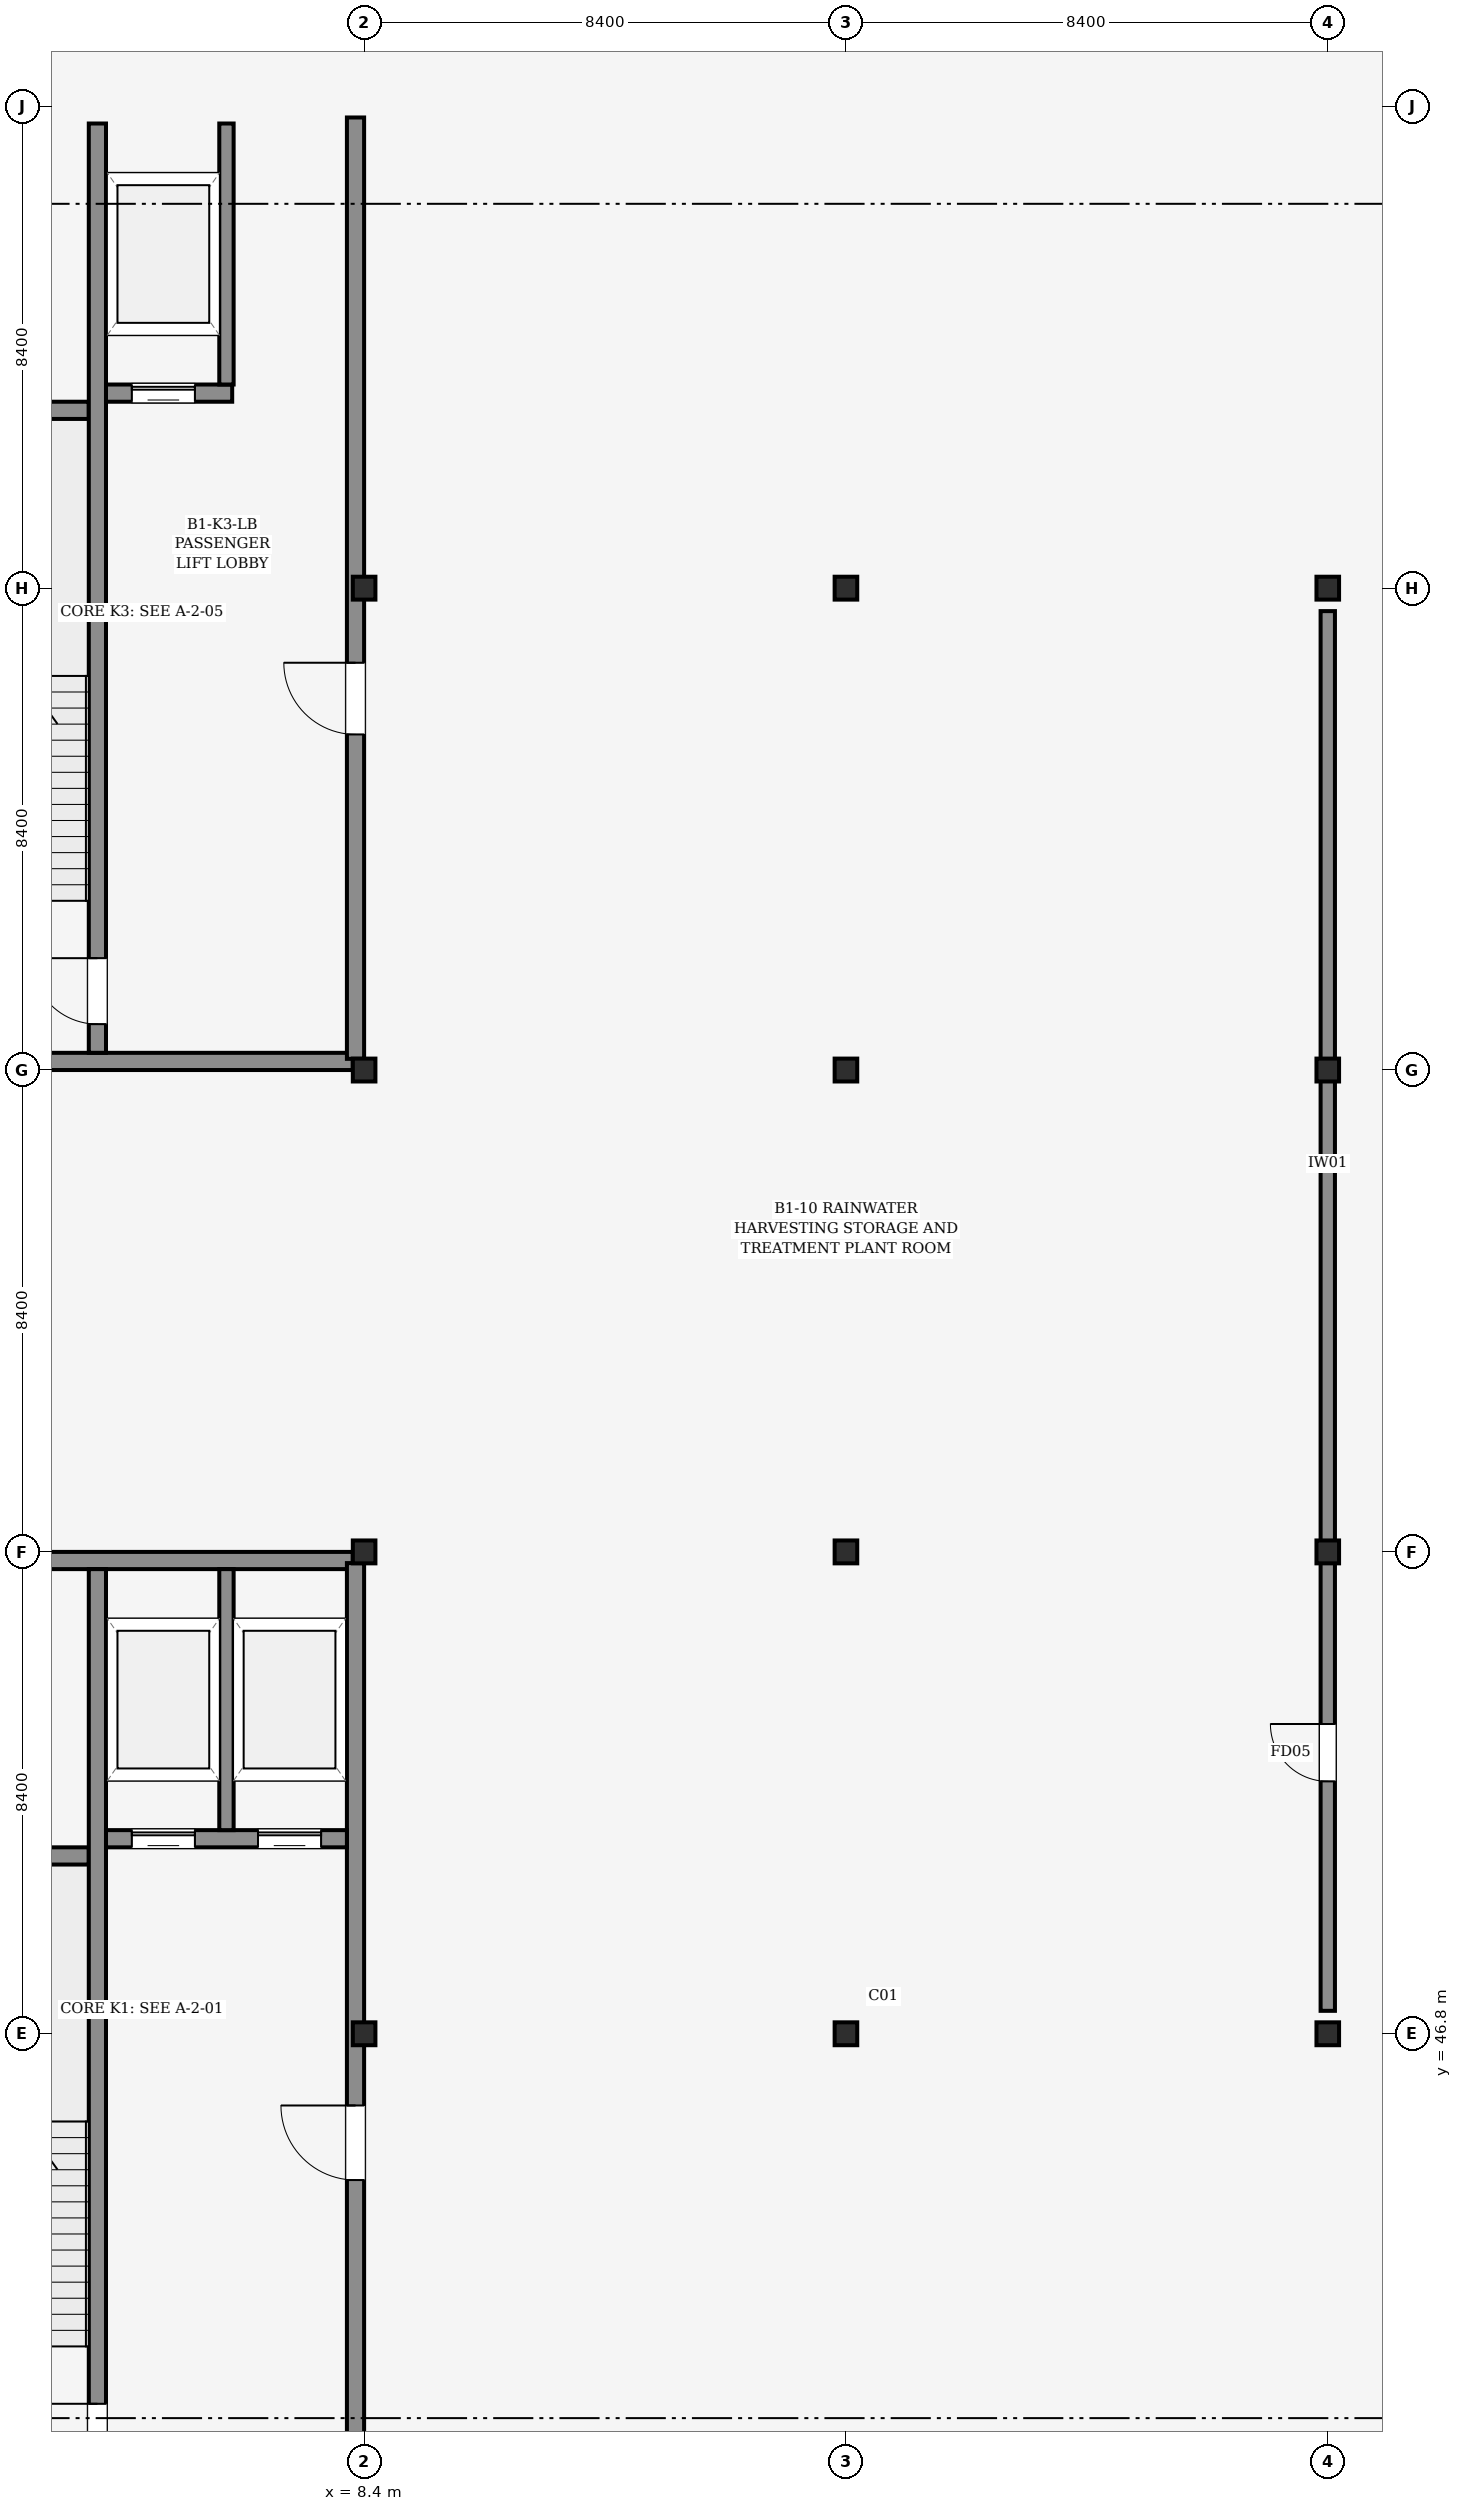
"""IFC4 building model, lengths in metres.
Left out: names, types, materials, properties, quantities, classifications, styles, units other than length and angle.
Written with IfcOpenShell. Run it as: python <this file> out.ifc"""

import sys

from ifc_helpers import new_model, si_unit, direction, frame, frame_2d, origin, origin_2d, place, context, subcontext, project, spatial, rectangle, i_section, extrude, element, fill, save


model = new_model("IFC4")
c1 = context("Model", 3, precision=1e-05, world=origin(), true_north=direction((0.0, 1.0)))
c2 = subcontext(c1, "Body", "Model", "MODEL_VIEW")
j1 = project(units=[si_unit("LENGTHUNIT", "METRE"), si_unit("PLANEANGLEUNIT", "RADIAN")], contexts=[c1])
p1 = place(None, origin())
s1 = spatial("IfcSite", under=j1, at=p1, CompositionType="ELEMENT")
p2 = place(p1, origin())
s2 = spatial("IfcBuilding", under=s1, at=p2, CompositionType="ELEMENT")
p3 = place(p2, frame((0.0, 0.0, -5.4)))
s3 = spatial("IfcBuildingStorey", under=s2, at=p3, CompositionType="ELEMENT", Elevation=-5.4)
for number, where, z_axis, x_axis in (
    (1, (8.4, 46.8, 0.0), (0.0, 0.0, 1.0), (1.0, 0.0, 0.0)),
    (2, (8.4, 55.2, 0.0), (0.0, 0.0, 1.0), (1.0, 0.0, 0.0)),
    (3, (8.4, 63.6, 0.0), (0.0, 0.0, 1.0), (1.0, 0.0, 0.0)),
    (4, (8.4, 72.0, 0.0), (0.0, 0.0, 1.0), (1.0, 0.0, 0.0)),
    (5, (8.4, 80.4, 0.0), (0.0, 0.0, 1.0), (1.0, 0.0, 0.0)),
    (6, (16.8, 46.8, 0.0), (0.0, 0.0, 1.0), (1.0, 0.0, 0.0)),
    (7, (16.8, 55.2, 0.0), (0.0, 0.0, 1.0), (1.0, 0.0, 0.0)),
    (8, (16.8, 63.6, 0.0), (0.0, 0.0, 1.0), (1.0, 0.0, 0.0)),
    (9, (16.8, 72.0, 0.0), (0.0, 0.0, 1.0), (1.0, 0.0, 0.0)),
    (10, (16.8, 80.4, 0.0), (0.0, 0.0, 1.0), (1.0, 0.0, 0.0)),
    (11, (25.2, 46.8, 0.0), (0.0, 0.0, 1.0), (1.0, 0.0, 0.0)),
    (12, (25.2, 55.2, 0.0), (0.0, 0.0, 1.0), (1.0, 0.0, 0.0)),
    (13, (25.2, 63.6, 0.0), (0.0, 0.0, 1.0), (1.0, 0.0, 0.0)),
    (14, (25.2, 72.0, 0.0), (0.0, 0.0, 1.0), (1.0, 0.0, 0.0)),
    (15, (25.2, 80.4, 0.0), (0.0, 0.0, 1.0), (1.0, 0.0, 0.0)),
):
    element("IfcColumn", number, at=place(p3, frame(where, z_axis=z_axis, x_axis=x_axis)), inside=s3, PredefinedType="COLUMN", context=c2, shape_type="SweptSolid", body=[
        extrude(i_section(OverallWidth=0.399, OverallDepth=0.394, WebThickness=0.023, FlangeThickness=0.037, FilletRadius=0.015, at=origin_2d()), origin(), (0.0, 0.0, 1.0), 5.4),
    ])
p4 = place(p3, frame((0.198, 55.05, 0.0), z_axis=(0.0, 0.0, 1.0), x_axis=(1.0, 0.0, 0.0)))
e16 = element("IfcWall", 16, at=p4, inside=s3, PredefinedType="SHEAR", context=c2, shape_type="SweptSolid", body=[
    extrude(rectangle(XDim=8.005, YDim=0.3, at=frame_2d((4.002, 0.0))), origin(), (0.0, 0.0, 1.0), 5.12),
])
p5 = place(p3, frame((0.3, 49.9, 0.0), z_axis=(0.0, 0.0, 1.0), x_axis=(1.0, 0.0, 0.0)))
e17 = element("IfcWall", 17, at=p5, inside=s3, PredefinedType="SHEAR", context=c2, shape_type="SweptSolid", body=[
    extrude(rectangle(XDim=3.3, YDim=0.3, at=frame_2d((1.65, 0.0))), origin(), (0.0, 0.0, 1.0), 5.12),
])
p6 = place(p3, frame((8.25, 38.595, 0.0), z_axis=(0.0, 0.0, 1.0), x_axis=(0.0, 1.0, 0.0)))
e18 = element("IfcWall", 18, at=p6, inside=s3, PredefinedType="SHEAR", context=c2, shape_type="SweptSolid", body=[
    extrude(rectangle(XDim=16.41, YDim=0.3, at=frame_2d((8.205, 0.0))), origin(), (0.0, 0.0, 1.0), 5.12),
])
p7 = place(p6, frame((5.655, 0.0, 0.0)))
e19 = element("IfcOpeningElement", 19, at=p7, cuts=e18, PredefinedType="OPENING", context=c2, shape_type="SweptSolid", body=[
    extrude(rectangle(XDim=1.3, YDim=2.2, at=frame_2d((0.65, 1.1))), frame((0.0, 0.16, 0.0), z_axis=(0.0, -1.0, 0.0), x_axis=(1.0, 0.0, 0.0)), (0.0, 0.0, 1.0), 0.32),
])
p8 = place(p3, frame((3.75, 38.7, 0.0), z_axis=(0.0, 0.0, 1.0), x_axis=(0.0, 1.0, 0.0)))
e20 = element("IfcWall", 20, at=p8, inside=s3, PredefinedType="SHEAR", context=c2, shape_type="SweptSolid", body=[
    extrude(rectangle(XDim=16.2, YDim=0.3, at=frame_2d((8.1, 0.0))), origin(), (0.0, 0.0, 1.0), 5.12),
])
p9 = place(p8, frame((0.5, 0.0, 0.0)))
e21 = element("IfcOpeningElement", 21, at=p9, cuts=e20, PredefinedType="OPENING", context=c2, shape_type="SweptSolid", body=[
    extrude(rectangle(XDim=1.15, YDim=2.15, at=frame_2d((0.575, 1.075))), frame((0.0, 0.16, 0.0), z_axis=(0.0, -1.0, 0.0), x_axis=(1.0, 0.0, 0.0)), (0.0, 0.0, 1.0), 0.32),
])
p10 = place(p3, frame((3.9, 50.2, 0.0), z_axis=(0.0, 0.0, 1.0), x_axis=(1.0, 0.0, 0.0)))
e22 = element("IfcWall", 22, at=p10, inside=s3, PredefinedType="SHEAR", context=c2, shape_type="SweptSolid", body=[
    extrude(rectangle(XDim=4.2, YDim=0.3, at=frame_2d((2.1, 0.0))), origin(), (0.0, 0.0, 1.0), 5.12),
])
p11 = place(p10, frame((0.45, 0.0, 0.0)))
e23 = element("IfcOpeningElement", 23, at=p11, cuts=e22, PredefinedType="OPENING", context=c2, shape_type="SweptSolid", body=[
    extrude(rectangle(XDim=1.1, YDim=2.2, at=frame_2d((0.55, 1.1))), frame((0.0, 0.16, 0.0), z_axis=(0.0, -1.0, 0.0), x_axis=(1.0, 0.0, 0.0)), (0.0, 0.0, 1.0), 0.32),
])
p12 = place(p10, frame((2.65, 0.0, 0.0)))
e24 = element("IfcOpeningElement", 24, at=p12, cuts=e22, PredefinedType="OPENING", context=c2, shape_type="SweptSolid", body=[
    extrude(rectangle(XDim=1.1, YDim=2.2, at=frame_2d((0.55, 1.1))), frame((0.0, 0.16, 0.0), z_axis=(0.0, -1.0, 0.0), x_axis=(1.0, 0.0, 0.0)), (0.0, 0.0, 1.0), 0.32),
])
p13 = place(p3, frame((6.0, 50.35, 0.0), z_axis=(0.0, 0.0, 1.0), x_axis=(0.0, 1.0, 0.0)))
e25 = element("IfcWall", 25, at=p13, inside=s3, PredefinedType="PARTITIONING", context=c2, shape_type="SweptSolid", body=[
    extrude(rectangle(XDim=4.55, YDim=0.25, at=frame_2d((2.275, 0.0))), origin(), (0.0, 0.0, 1.0), 4.025),
])
for number, where, z_axis, x_axis in (
    (26, (0.198, 63.75, 0.0), (0.0, 0.0, 1.0), (1.0, 0.0, 0.0)),
    (27, (0.198, 80.25, 0.0), (0.0, 0.0, 1.0), (1.0, 0.0, 0.0)),
):
    element("IfcWall", number, at=place(p3, frame(where, z_axis=z_axis, x_axis=x_axis)), inside=s3, PredefinedType="SHEAR", context=c2, shape_type="SweptSolid", body=[
        extrude(rectangle(XDim=8.005, YDim=0.3, at=frame_2d((4.002, 0.0))), origin(), (0.0, 0.0, 1.0), 5.12),
    ])
p14 = place(p3, frame((0.3, 75.1, 0.0), z_axis=(0.0, 0.0, 1.0), x_axis=(1.0, 0.0, 0.0)))
e28 = element("IfcWall", 28, at=p14, inside=s3, PredefinedType="SHEAR", context=c2, shape_type="SweptSolid", body=[
    extrude(rectangle(XDim=3.3, YDim=0.3, at=frame_2d((1.65, 0.0))), origin(), (0.0, 0.0, 1.0), 5.12),
])
p15 = place(p3, frame((8.25, 63.795, 0.0), z_axis=(0.0, 0.0, 1.0), x_axis=(0.0, 1.0, 0.0)))
e29 = element("IfcWall", 29, at=p15, inside=s3, PredefinedType="SHEAR", context=c2, shape_type="SweptSolid", body=[
    extrude(rectangle(XDim=16.41, YDim=0.3, at=frame_2d((8.205, 0.0))), origin(), (0.0, 0.0, 1.0), 5.12),
])
p16 = place(p15, frame((5.655, 0.0, 0.0)))
e30 = element("IfcOpeningElement", 30, at=p16, cuts=e29, PredefinedType="OPENING", context=c2, shape_type="SweptSolid", body=[
    extrude(rectangle(XDim=1.25, YDim=2.15, at=frame_2d((0.625, 1.075))), frame((0.0, 0.16, 0.0), z_axis=(0.0, -1.0, 0.0), x_axis=(1.0, 0.0, 0.0)), (0.0, 0.0, 1.0), 0.32),
])
p17 = place(p3, frame((3.75, 63.9, 0.0), z_axis=(0.0, 0.0, 1.0), x_axis=(0.0, 1.0, 0.0)))
e31 = element("IfcWall", 31, at=p17, inside=s3, PredefinedType="SHEAR", context=c2, shape_type="SweptSolid", body=[
    extrude(rectangle(XDim=16.2, YDim=0.3, at=frame_2d((8.1, 0.0))), origin(), (0.0, 0.0, 1.0), 5.12),
])
p18 = place(p17, frame((0.5, 0.0, 0.0)))
e32 = element("IfcOpeningElement", 32, at=p18, cuts=e31, PredefinedType="OPENING", context=c2, shape_type="SweptSolid", body=[
    extrude(rectangle(XDim=1.15, YDim=2.15, at=frame_2d((0.575, 1.075))), frame((0.0, 0.16, 0.0), z_axis=(0.0, -1.0, 0.0), x_axis=(1.0, 0.0, 0.0)), (0.0, 0.0, 1.0), 0.32),
])
p19 = place(p3, frame((3.9, 75.4, 0.0), z_axis=(0.0, 0.0, 1.0), x_axis=(1.0, 0.0, 0.0)))
e33 = element("IfcWall", 33, at=p19, inside=s3, PredefinedType="SHEAR", context=c2, shape_type="SweptSolid", body=[
    extrude(rectangle(XDim=2.2, YDim=0.3, at=frame_2d((1.1, 0.0))), origin(), (0.0, 0.0, 1.0), 5.12),
])
p20 = place(p19, frame((0.45, 0.0, 0.0)))
e34 = element("IfcOpeningElement", 34, at=p20, cuts=e33, PredefinedType="OPENING", context=c2, shape_type="SweptSolid", body=[
    extrude(rectangle(XDim=1.1, YDim=2.2, at=frame_2d((0.55, 1.1))), frame((0.0, 0.16, 0.0), z_axis=(0.0, -1.0, 0.0), x_axis=(1.0, 0.0, 0.0)), (0.0, 0.0, 1.0), 0.32),
])
p21 = place(p3, frame((6.0, 75.55, 0.0), z_axis=(0.0, 0.0, 1.0), x_axis=(0.0, 1.0, 0.0)))
e35 = element("IfcWall", 35, at=p21, inside=s3, PredefinedType="PARTITIONING", context=c2, shape_type="SweptSolid", body=[
    extrude(rectangle(XDim=4.55, YDim=0.25, at=frame_2d((2.275, 0.0))), origin(), (0.0, 0.0, 1.0), 4.025),
])
p22 = place(p3, frame((25.2, 47.2, 0.0), z_axis=(0.0, 0.0, 1.0), x_axis=(0.0, 1.0, 0.0)))
e36 = element("IfcWall", 36, at=p22, inside=s3, PredefinedType="PARTITIONING", context=c2, shape_type="SweptSolid", body=[
    extrude(rectangle(XDim=24.4, YDim=0.25, at=frame_2d((12.2, 0.0))), origin(), (0.0, 0.0, 1.0), 4.025),
])
p23 = place(p22, frame((4.0, 0.0, 0.0)))
e37 = element("IfcOpeningElement", 37, at=p23, cuts=e36, PredefinedType="OPENING", context=c2, shape_type="SweptSolid", body=[
    extrude(rectangle(XDim=1.0, YDim=2.15, at=frame_2d((0.5, 1.075))), frame((0.0, 0.135, 0.0), z_axis=(0.0, -1.0, 0.0), x_axis=(1.0, 0.0, 0.0)), (0.0, 0.0, 1.0), 0.27),
])
p24 = place(p7, origin())
e38 = element("IfcDoor", 38, at=p24, inside=s3, OperationType="SINGLE_SWING_RIGHT", PredefinedType="DOOR", context=c2, shape_type="SweptSolid", body=[
    extrude(rectangle(XDim=1.3, YDim=2.2, at=frame_2d((0.65, 1.1))), frame((0.0, 0.025, 0.0), z_axis=(0.0, -1.0, 0.0), x_axis=(1.0, 0.0, 0.0)), (0.0, 0.0, 1.0), 0.05),
])
fill(e19, e38)
p25 = place(p9, frame((1.15, 0.0, 0.0), z_axis=(0.0, 0.0, 1.0), x_axis=(-1.0, 0.0, 0.0)))
e39 = element("IfcDoor", 39, at=p25, inside=s3, OperationType="SINGLE_SWING_LEFT", PredefinedType="DOOR", context=c2, shape_type="SweptSolid", body=[
    extrude(rectangle(XDim=1.15, YDim=2.15, at=frame_2d((0.575, 1.075))), frame((0.0, 0.025, 0.0), z_axis=(0.0, -1.0, 0.0), x_axis=(1.0, 0.0, 0.0)), (0.0, 0.0, 1.0), 0.05),
])
fill(e21, e39)
p26 = place(p11, origin())
e40 = element("IfcDoor", 40, at=p26, inside=s3, OperationType="SLIDING_TO_LEFT", PredefinedType="DOOR", context=c2, shape_type="SweptSolid", body=[
    extrude(rectangle(XDim=1.1, YDim=2.2, at=frame_2d((0.55, 1.1))), frame((0.0, 0.025, 0.0), z_axis=(0.0, -1.0, 0.0), x_axis=(1.0, 0.0, 0.0)), (0.0, 0.0, 1.0), 0.05),
])
fill(e23, e40)
p27 = place(p12, origin())
e41 = element("IfcDoor", 41, at=p27, inside=s3, OperationType="SLIDING_TO_LEFT", PredefinedType="DOOR", context=c2, shape_type="SweptSolid", body=[
    extrude(rectangle(XDim=1.1, YDim=2.2, at=frame_2d((0.55, 1.1))), frame((0.0, 0.025, 0.0), z_axis=(0.0, -1.0, 0.0), x_axis=(1.0, 0.0, 0.0)), (0.0, 0.0, 1.0), 0.05),
])
fill(e24, e41)
p28 = place(p16, origin())
e42 = element("IfcDoor", 42, at=p28, inside=s3, OperationType="SINGLE_SWING_RIGHT", PredefinedType="DOOR", context=c2, shape_type="SweptSolid", body=[
    extrude(rectangle(XDim=1.25, YDim=2.15, at=frame_2d((0.625, 1.075))), frame((0.0, 0.025, 0.0), z_axis=(0.0, -1.0, 0.0), x_axis=(1.0, 0.0, 0.0)), (0.0, 0.0, 1.0), 0.05),
])
fill(e30, e42)
p29 = place(p18, frame((1.15, 0.0, 0.0), z_axis=(0.0, 0.0, 1.0), x_axis=(-1.0, 0.0, 0.0)))
e43 = element("IfcDoor", 43, at=p29, inside=s3, OperationType="SINGLE_SWING_LEFT", PredefinedType="DOOR", context=c2, shape_type="SweptSolid", body=[
    extrude(rectangle(XDim=1.15, YDim=2.15, at=frame_2d((0.575, 1.075))), frame((0.0, 0.025, 0.0), z_axis=(0.0, -1.0, 0.0), x_axis=(1.0, 0.0, 0.0)), (0.0, 0.0, 1.0), 0.05),
])
fill(e32, e43)
p30 = place(p20, origin())
e44 = element("IfcDoor", 44, at=p30, inside=s3, OperationType="SLIDING_TO_LEFT", PredefinedType="DOOR", context=c2, shape_type="SweptSolid", body=[
    extrude(rectangle(XDim=1.1, YDim=2.2, at=frame_2d((0.55, 1.1))), frame((0.0, 0.025, 0.0), z_axis=(0.0, -1.0, 0.0), x_axis=(1.0, 0.0, 0.0)), (0.0, 0.0, 1.0), 0.05),
])
fill(e34, e44)
p31 = place(p23, origin())
e45 = element("IfcDoor", 45, at=p31, inside=s3, OperationType="SINGLE_SWING_RIGHT", PredefinedType="DOOR", context=c2, shape_type="SweptSolid", body=[
    extrude(rectangle(XDim=1.0, YDim=2.15, at=frame_2d((0.5, 1.075))), frame((0.0, 0.025, 0.0), z_axis=(0.0, -1.0, 0.0), x_axis=(1.0, 0.0, 0.0)), (0.0, 0.0, 1.0), 0.05),
])
fill(e37, e45)
save(model, sys.argv[1])
